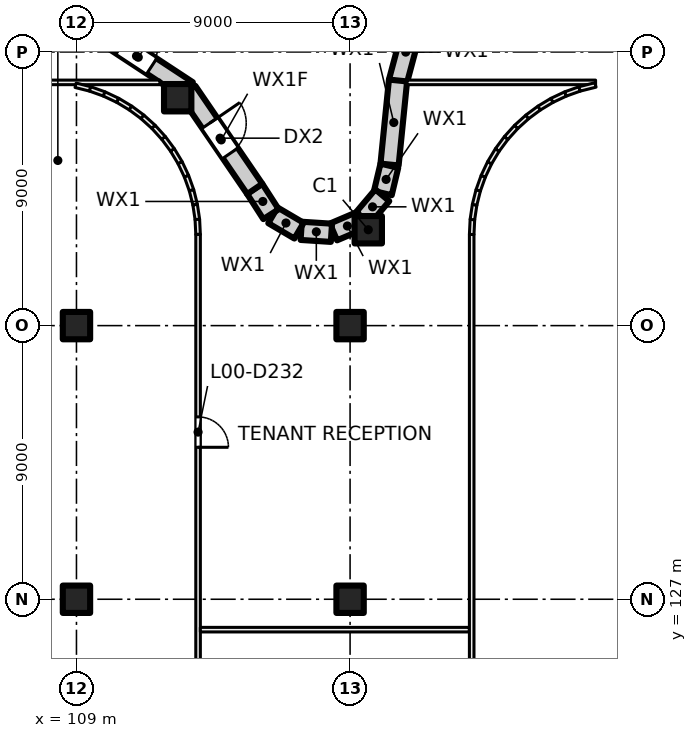
"""IFC4 building model, lengths in metres.
Left out: names, types, materials, properties, quantities, classifications, styles, units other than length and angle.
Written with IfcOpenShell. Run it as: python <this file> out.ifc"""

import sys

from ifc_helpers import new_model, si_unit, direction, frame, frame_2d, origin, origin_2d, place, context, subcontext, project, spatial, rectangle, extrude, element, fill, save


model = new_model("IFC4")
c1 = context("Model", 3, precision=1e-05, world=origin(), true_north=direction((0.0, 1.0)))
c2 = subcontext(c1, "Body", "Model", "MODEL_VIEW")
j1 = project(units=[si_unit("LENGTHUNIT", "METRE"), si_unit("PLANEANGLEUNIT", "RADIAN")], contexts=[c1])
p1 = place(None, origin())
s1 = spatial("IfcSite", under=j1, at=p1, CompositionType="ELEMENT")
p2 = place(p1, origin())
s2 = spatial("IfcBuilding", under=s1, at=p2, CompositionType="ELEMENT")
p3 = place(p2, origin())
s3 = spatial("IfcBuildingStorey", under=s2, at=p3, CompositionType="ELEMENT", Elevation=0.0)
for number, where, z_axis, x_axis in (
    (1, (109.0, 127.0, 0.0), (0.0, 0.0, 1.0), (1.0, 0.0, 0.0)),
    (2, (109.0, 136.0, 0.0), (0.0, 0.0, 1.0), (1.0, 0.0, 0.0)),
    (3, (118.0, 127.0, 0.0), (0.0, 0.0, 1.0), (1.0, 0.0, 0.0)),
    (4, (118.0, 136.0, 0.0), (0.0, 0.0, 1.0), (1.0, 0.0, 0.0)),
    (5, (112.329, 143.496, 0.0), (0.0, 0.0, 1.0), (1.0, 0.0, 0.0)),
    (6, (118.598, 139.153, 0.0), (0.0, 0.0, 1.0), (1.0, 0.0, 0.0)),
):
    element("IfcColumn", number, at=place(p3, frame(where, z_axis=z_axis, x_axis=x_axis)), inside=s3, PredefinedType="COLUMN", context=c2, shape_type="SweptSolid", body=[
        extrude(rectangle(XDim=0.9, YDim=0.9, at=origin_2d()), origin(), (0.0, 0.0, 1.0), 7.5),
    ])
p4 = place(p3, frame((119.571, 144.024, 0.0), z_axis=(0.0, 0.0, 1.0), x_axis=(0.25888565912, 0.965907974655, 0.0)))
e7 = element("IfcWall", 7, at=p4, inside=s3, PredefinedType="SOLIDWALL", context=c2, shape_type="SweptSolid", body=[
    extrude(rectangle(XDim=2.012, YDim=0.6, at=frame_2d((1.006, 0.0))), origin(), (0.0, 0.0, 1.0), 7.1),
])
p5 = place(p3, frame((119.299, 141.298, 0.0), z_axis=(0.0, 0.0, 1.0), x_axis=(0.100121632527, 0.994975205068, 0.0)))
e8 = element("IfcWall", 8, at=p5, inside=s3, PredefinedType="SOLIDWALL", context=c2, shape_type="SweptSolid", body=[
    extrude(rectangle(XDim=2.777, YDim=0.6, at=frame_2d((1.389, 0.0))), origin(), (0.0, 0.0, 1.0), 7.1),
])
p6 = place(p3, frame((119.077, 140.358, 0.0), z_axis=(0.0, 0.0, 1.0), x_axis=(0.231477954295, 0.972840149601, 0.0)))
e9 = element("IfcWall", 9, at=p6, inside=s3, PredefinedType="SOLIDWALL", context=c2, shape_type="SweptSolid", body=[
    extrude(rectangle(XDim=0.926, YDim=0.6, at=frame_2d((0.463, 0.0))), origin(), (0.0, 0.0, 1.0), 7.1),
])
for number, where, z_axis, x_axis in (
    (10, (118.417, 139.526, 0.0), (0.0, 0.0, 1.0), (0.645, 0.764, 0.0)),
    (11, (117.454, 139.081, 0.0), (0.0, 0.0, 1.0), (0.92, 0.392, 0.0)),
    (12, (116.393, 139.117, 0.0), (0.0, 0.0, 1.0), (0.998, -0.064, 0.0)),
    (13, (115.461, 139.627, 0.0), (0.0, 0.0, 1.0), (0.862, -0.507, 0.0)),
):
    element("IfcWall", number, at=place(p3, frame(where, z_axis=z_axis, x_axis=x_axis)), inside=s3, PredefinedType="SOLIDWALL", context=c2, shape_type="SweptSolid", body=[
        extrude(rectangle(XDim=0.996, YDim=0.6, at=frame_2d((0.498, 0.0))), origin(), (0.0, 0.0, 1.0), 7.1),
    ])
p7 = place(p3, frame((114.86, 140.502, 0.0), z_axis=(0.0, 0.0, 1.0), x_axis=(0.541339592117, -0.84080404733, 0.0)))
e14 = element("IfcWall", 14, at=p7, inside=s3, PredefinedType="SOLIDWALL", context=c2, shape_type="SweptSolid", body=[
    extrude(rectangle(XDim=0.996, YDim=0.6, at=frame_2d((0.498, 0.0))), origin(), (0.0, 0.0, 1.0), 7.1),
])
p8 = place(p3, frame((112.661, 143.72, 0.0), z_axis=(0.0, 0.0, 1.0), x_axis=(0.564314082571, -0.825560183277, 0.0)))
e15 = element("IfcWall", 15, at=p8, inside=s3, PredefinedType="SOLIDWALL", context=c2, shape_type="SweptSolid", body=[
    extrude(rectangle(XDim=3.905, YDim=0.6, at=frame_2d((1.953, 0.0))), origin(), (0.0, 0.0, 1.0), 7.1),
])
p9 = place(p8, frame((1.283, 0.0, 0.0)))
e16 = element("IfcOpeningElement", 16, at=p9, cuts=e15, PredefinedType="OPENING", context=c2, shape_type="SweptSolid", body=[
    extrude(rectangle(XDim=1.2, YDim=2.4, at=frame_2d((0.6, 1.2))), frame((0.0, 0.31, 0.0), z_axis=(0.0, -1.0, 0.0), x_axis=(1.0, 0.0, 0.0)), (0.0, 0.0, 1.0), 0.62),
])
p10 = place(p3, frame((109.401, 145.9, 0.0), z_axis=(0.0, 0.0, 1.0), x_axis=(0.835543958523, -0.549423601037, 0.0)))
e17 = element("IfcWall", 17, at=p10, inside=s3, PredefinedType="SOLIDWALL", context=c2, shape_type="SweptSolid", body=[
    extrude(rectangle(XDim=3.906, YDim=0.6, at=frame_2d((1.953, 0.0))), origin(), (0.0, 0.0, 1.0), 7.1),
])
p11 = place(p10, frame((1.283, 0.0, 0.0)))
e18 = element("IfcOpeningElement", 18, at=p11, cuts=e17, PredefinedType="OPENING", context=c2, shape_type="SweptSolid", body=[
    extrude(rectangle(XDim=1.2, YDim=2.4, at=frame_2d((0.6, 1.2))), frame((0.0, 0.31, 0.0), z_axis=(0.0, -1.0, 0.0), x_axis=(1.0, 0.0, 0.0)), (0.0, 0.0, 1.0), 0.62),
])
p12 = place(p3, frame((111.744, 144.0, 0.0), z_axis=(0.0, 0.0, 1.0), x_axis=(-1.0, 0.0, 0.0)))
e19 = element("IfcWall", 19, at=p12, inside=s3, PredefinedType="PARTITIONING", context=c2, shape_type="SweptSolid", body=[
    extrude(rectangle(XDim=7.907, YDim=0.15, at=frame_2d((3.954, 0.0))), origin(), (0.0, 0.0, 1.0), 7.1),
])
p13 = place(p12, frame((5.376, 0.0, 0.0)))
e20 = element("IfcOpeningElement", 20, at=p13, cuts=e19, PredefinedType="OPENING", context=c2, shape_type="SweptSolid", body=[
    extrude(rectangle(XDim=1.0, YDim=2.1, at=frame_2d((0.5, 1.05))), frame((0.0, 0.085, 0.0), z_axis=(0.0, -1.0, 0.0), x_axis=(1.0, 0.0, 0.0)), (0.0, 0.0, 1.0), 0.17),
])
p14 = place(p3, frame((108.971, 143.905, 0.0), z_axis=(0.0, 0.0, 1.0), x_axis=(0.970113715952, -0.242650732785, 0.0)))
e21 = element("IfcWall", 21, at=p14, inside=s3, PredefinedType="PARTITIONING", context=c2, shape_type="SweptSolid", body=[
    extrude(rectangle(XDim=0.499, YDim=0.15, at=frame_2d((0.25, 0.0))), origin(), (0.0, 0.0, 1.0), 7.1),
])
for number, where, z_axis, x_axis in (
    (22, (109.447, 143.786, 0.0), (0.0, 0.0, 1.0), (0.941, -0.337, 0.0)),
    (23, (109.91, 143.621, 0.0), (0.0, 0.0, 1.0), (0.904, -0.428, 0.0)),
):
    element("IfcWall", number, at=place(p3, frame(where, z_axis=z_axis, x_axis=x_axis)), inside=s3, PredefinedType="PARTITIONING", context=c2, shape_type="SweptSolid", body=[
        extrude(rectangle(XDim=0.498, YDim=0.15, at=frame_2d((0.249, 0.0))), origin(), (0.0, 0.0, 1.0), 7.1),
    ])
p15 = place(p3, frame((110.354, 143.412, 0.0), z_axis=(0.0, 0.0, 1.0), x_axis=(0.85671397893, -0.515791778052, 0.0)))
e24 = element("IfcWall", 24, at=p15, inside=s3, PredefinedType="PARTITIONING", context=c2, shape_type="SweptSolid", body=[
    extrude(rectangle(XDim=0.499, YDim=0.15, at=frame_2d((0.249, 0.0))), origin(), (0.0, 0.0, 1.0), 7.1),
])
p16 = place(p3, frame((110.775, 143.159, 0.0), z_axis=(0.0, 0.0, 1.0), x_axis=(0.80404358372, -0.594570362092, 0.0)))
e25 = element("IfcWall", 25, at=p16, inside=s3, PredefinedType="PARTITIONING", context=c2, shape_type="SweptSolid", body=[
    extrude(rectangle(XDim=0.498, YDim=0.15, at=frame_2d((0.249, 0.0))), origin(), (0.0, 0.0, 1.0), 7.1),
])
for number, where, z_axis, x_axis in (
    (26, (111.169, 142.867, 0.0), (0.0, 0.0, 1.0), (0.742, -0.67, 0.0)),
    (27, (111.533, 142.539, 0.0), (0.0, 0.0, 1.0), (0.67, -0.742, 0.0)),
):
    element("IfcWall", number, at=place(p3, frame(where, z_axis=z_axis, x_axis=x_axis)), inside=s3, PredefinedType="PARTITIONING", context=c2, shape_type="SweptSolid", body=[
        extrude(rectangle(XDim=0.499, YDim=0.15, at=frame_2d((0.249, 0.0))), origin(), (0.0, 0.0, 1.0), 7.1),
    ])
p17 = place(p3, frame((111.863, 142.175, 0.0), z_axis=(0.0, 0.0, 1.0), x_axis=(0.594570362092, -0.80404358372, 0.0)))
e28 = element("IfcWall", 28, at=p17, inside=s3, PredefinedType="PARTITIONING", context=c2, shape_type="SweptSolid", body=[
    extrude(rectangle(XDim=0.498, YDim=0.15, at=frame_2d((0.249, 0.0))), origin(), (0.0, 0.0, 1.0), 7.1),
])
p18 = place(p3, frame((112.155, 141.781, 0.0), z_axis=(0.0, 0.0, 1.0), x_axis=(0.515791778052, -0.85671397893, 0.0)))
e29 = element("IfcWall", 29, at=p18, inside=s3, PredefinedType="PARTITIONING", context=c2, shape_type="SweptSolid", body=[
    extrude(rectangle(XDim=0.499, YDim=0.15, at=frame_2d((0.249, 0.0))), origin(), (0.0, 0.0, 1.0), 7.1),
])
for number, where, z_axis, x_axis in (
    (30, (112.408, 141.36, 0.0), (0.0, 0.0, 1.0), (0.428, -0.904, 0.0)),
    (31, (112.618, 140.916, 0.0), (0.0, 0.0, 1.0), (0.337, -0.941, 0.0)),
):
    element("IfcWall", number, at=place(p3, frame(where, z_axis=z_axis, x_axis=x_axis)), inside=s3, PredefinedType="PARTITIONING", context=c2, shape_type="SweptSolid", body=[
        extrude(rectangle(XDim=0.498, YDim=0.15, at=frame_2d((0.249, 0.0))), origin(), (0.0, 0.0, 1.0), 7.1),
    ])
p19 = place(p3, frame((112.784, 140.455, 0.0), z_axis=(0.0, 0.0, 1.0), x_axis=(0.242650732785, -0.970113715952, 0.0)))
e32 = element("IfcWall", 32, at=p19, inside=s3, PredefinedType="PARTITIONING", context=c2, shape_type="SweptSolid", body=[
    extrude(rectangle(XDim=0.499, YDim=0.15, at=frame_2d((0.25, 0.0))), origin(), (0.0, 0.0, 1.0), 7.1),
])
p20 = place(p3, frame((112.903, 139.979, 0.0), z_axis=(0.0, 0.0, 1.0), x_axis=(0.148412307247, -0.988925572052, 0.0)))
e33 = element("IfcWall", 33, at=p20, inside=s3, PredefinedType="PARTITIONING", context=c2, shape_type="SweptSolid", body=[
    extrude(rectangle(XDim=0.499, YDim=0.15, at=frame_2d((0.249, 0.0))), origin(), (0.0, 0.0, 1.0), 7.1),
])
p21 = place(p3, frame((112.976, 139.494, 0.0), z_axis=(0.0, 0.0, 1.0), x_axis=(0.048196018647, -0.998837896651, 0.0)))
e34 = element("IfcWall", 34, at=p21, inside=s3, PredefinedType="PARTITIONING", context=c2, shape_type="SweptSolid", body=[
    extrude(rectangle(XDim=0.496, YDim=0.15, at=frame_2d((0.248, 0.0))), origin(), (0.0, 0.0, 1.0), 7.1),
])
p22 = place(p3, frame((113.0, 139.002, 0.0), z_axis=(0.0, 0.0, 1.0), x_axis=(0.0, -1.0, 0.0)))
e35 = element("IfcWall", 35, at=p22, inside=s3, PredefinedType="PARTITIONING", context=c2, shape_type="SweptSolid", body=[
    extrude(rectangle(XDim=22.004, YDim=0.15, at=frame_2d((11.002, 0.0))), origin(), (0.0, 0.0, 1.0), 7.1),
])
p23 = place(p22, frame((17.0, 0.0, 0.0)))
e36 = element("IfcOpeningElement", 36, at=p23, cuts=e35, PredefinedType="OPENING", context=c2, shape_type="SweptSolid", body=[
    extrude(rectangle(XDim=1.0, YDim=2.1, at=frame_2d((0.5, 1.05))), frame((0.0, 0.085, 0.0), z_axis=(0.0, -1.0, 0.0), x_axis=(1.0, 0.0, 0.0)), (0.0, 0.0, 1.0), 0.17),
])
p24 = place(p22, frame((6.004, 0.0, 0.0)))
e37 = element("IfcOpeningElement", 37, at=p24, cuts=e35, PredefinedType="OPENING", context=c2, shape_type="SweptSolid", body=[
    extrude(rectangle(XDim=1.0, YDim=2.1, at=frame_2d((0.5, 1.05))), frame((0.0, 0.085, 0.0), z_axis=(0.0, -1.0, 0.0), x_axis=(1.0, 0.0, 0.0)), (0.0, 0.0, 1.0), 0.17),
])
p25 = place(p3, frame((113.075, 126.0, 0.0), z_axis=(0.0, 0.0, 1.0), x_axis=(1.0, 0.0, 0.0)))
e38 = element("IfcWall", 38, at=p25, inside=s3, PredefinedType="PARTITIONING", context=c2, shape_type="SweptSolid", body=[
    extrude(rectangle(XDim=8.85, YDim=0.15, at=frame_2d((4.425, 0.0))), origin(), (0.0, 0.0, 1.0), 7.1),
])
p26 = place(p3, frame((119.875, 144.0, 0.0), z_axis=(0.0, 0.0, 1.0), x_axis=(1.0, 0.0, 0.0)))
e39 = element("IfcWall", 39, at=p26, inside=s3, PredefinedType="PARTITIONING", context=c2, shape_type="SweptSolid", body=[
    extrude(rectangle(XDim=6.2, YDim=0.15, at=frame_2d((3.1, 0.0))), origin(), (0.0, 0.0, 1.0), 7.1),
])
p27 = place(p3, frame((122.0, 116.998, 0.0), z_axis=(0.0, 0.0, 1.0), x_axis=(0.0, 1.0, 0.0)))
e40 = element("IfcWall", 40, at=p27, inside=s3, PredefinedType="PARTITIONING", context=c2, shape_type="SweptSolid", body=[
    extrude(rectangle(XDim=22.004, YDim=0.15, at=frame_2d((11.002, 0.0))), origin(), (0.0, 0.0, 1.0), 7.1),
])
p28 = place(p3, frame((122.0, 138.998, 0.0), z_axis=(0.0, 0.0, 1.0), x_axis=(0.048196018647, 0.998837896651, 0.0)))
e41 = element("IfcWall", 41, at=p28, inside=s3, PredefinedType="PARTITIONING", context=c2, shape_type="SweptSolid", body=[
    extrude(rectangle(XDim=0.496, YDim=0.15, at=frame_2d((0.248, 0.0))), origin(), (0.0, 0.0, 1.0), 7.1),
])
p29 = place(p3, frame((122.023, 139.486, 0.0), z_axis=(0.0, 0.0, 1.0), x_axis=(0.148412307247, 0.988925572052, 0.0)))
e42 = element("IfcWall", 42, at=p29, inside=s3, PredefinedType="PARTITIONING", context=c2, shape_type="SweptSolid", body=[
    extrude(rectangle(XDim=0.499, YDim=0.15, at=frame_2d((0.249, 0.0))), origin(), (0.0, 0.0, 1.0), 7.1),
])
p30 = place(p3, frame((122.095, 139.971, 0.0), z_axis=(0.0, 0.0, 1.0), x_axis=(0.242650732785, 0.970113715952, 0.0)))
e43 = element("IfcWall", 43, at=p30, inside=s3, PredefinedType="PARTITIONING", context=c2, shape_type="SweptSolid", body=[
    extrude(rectangle(XDim=0.499, YDim=0.15, at=frame_2d((0.25, 0.0))), origin(), (0.0, 0.0, 1.0), 7.1),
])
for number, where, z_axis, x_axis in (
    (44, (122.214, 140.447, 0.0), (0.0, 0.0, 1.0), (0.337, 0.941, 0.0)),
    (45, (122.379, 140.91, 0.0), (0.0, 0.0, 1.0), (0.428, 0.904, 0.0)),
):
    element("IfcWall", number, at=place(p3, frame(where, z_axis=z_axis, x_axis=x_axis)), inside=s3, PredefinedType="PARTITIONING", context=c2, shape_type="SweptSolid", body=[
        extrude(rectangle(XDim=0.498, YDim=0.15, at=frame_2d((0.249, 0.0))), origin(), (0.0, 0.0, 1.0), 7.1),
    ])
p31 = place(p3, frame((122.588, 141.354, 0.0), z_axis=(0.0, 0.0, 1.0), x_axis=(0.515791778052, 0.85671397893, 0.0)))
e46 = element("IfcWall", 46, at=p31, inside=s3, PredefinedType="PARTITIONING", context=c2, shape_type="SweptSolid", body=[
    extrude(rectangle(XDim=0.499, YDim=0.15, at=frame_2d((0.249, 0.0))), origin(), (0.0, 0.0, 1.0), 7.1),
])
p32 = place(p3, frame((122.841, 141.775, 0.0), z_axis=(0.0, 0.0, 1.0), x_axis=(0.594570362092, 0.80404358372, 0.0)))
e47 = element("IfcWall", 47, at=p32, inside=s3, PredefinedType="PARTITIONING", context=c2, shape_type="SweptSolid", body=[
    extrude(rectangle(XDim=0.498, YDim=0.15, at=frame_2d((0.249, 0.0))), origin(), (0.0, 0.0, 1.0), 7.1),
])
for number, where, z_axis, x_axis in (
    (48, (123.133, 142.169, 0.0), (0.0, 0.0, 1.0), (0.67, 0.742, 0.0)),
    (49, (123.461, 142.533, 0.0), (0.0, 0.0, 1.0), (0.742, 0.67, 0.0)),
):
    element("IfcWall", number, at=place(p3, frame(where, z_axis=z_axis, x_axis=x_axis)), inside=s3, PredefinedType="PARTITIONING", context=c2, shape_type="SweptSolid", body=[
        extrude(rectangle(XDim=0.499, YDim=0.15, at=frame_2d((0.249, 0.0))), origin(), (0.0, 0.0, 1.0), 7.1),
    ])
p33 = place(p3, frame((123.825, 142.863, 0.0), z_axis=(0.0, 0.0, 1.0), x_axis=(0.80404358372, 0.594570362092, 0.0)))
e50 = element("IfcWall", 50, at=p33, inside=s3, PredefinedType="PARTITIONING", context=c2, shape_type="SweptSolid", body=[
    extrude(rectangle(XDim=0.498, YDim=0.15, at=frame_2d((0.249, 0.0))), origin(), (0.0, 0.0, 1.0), 7.1),
])
p34 = place(p3, frame((124.219, 143.155, 0.0), z_axis=(0.0, 0.0, 1.0), x_axis=(0.85671397893, 0.515791778052, 0.0)))
e51 = element("IfcWall", 51, at=p34, inside=s3, PredefinedType="PARTITIONING", context=c2, shape_type="SweptSolid", body=[
    extrude(rectangle(XDim=0.499, YDim=0.15, at=frame_2d((0.249, 0.0))), origin(), (0.0, 0.0, 1.0), 7.1),
])
for number, where, z_axis, x_axis in (
    (52, (124.64, 143.408, 0.0), (0.0, 0.0, 1.0), (0.904, 0.428, 0.0)),
    (53, (125.084, 143.618, 0.0), (0.0, 0.0, 1.0), (0.941, 0.337, 0.0)),
):
    element("IfcWall", number, at=place(p3, frame(where, z_axis=z_axis, x_axis=x_axis)), inside=s3, PredefinedType="PARTITIONING", context=c2, shape_type="SweptSolid", body=[
        extrude(rectangle(XDim=0.498, YDim=0.15, at=frame_2d((0.249, 0.0))), origin(), (0.0, 0.0, 1.0), 7.1),
    ])
p35 = place(p3, frame((125.545, 143.784, 0.0), z_axis=(0.0, 0.0, 1.0), x_axis=(0.970116111764, 0.242641154168, 0.0)))
e54 = element("IfcWall", 54, at=p35, inside=s3, PredefinedType="PARTITIONING", context=c2, shape_type="SweptSolid", body=[
    extrude(rectangle(XDim=0.544, YDim=0.15, at=frame_2d((0.272, 0.0))), origin(), (0.0, 0.0, 1.0), 7.1),
])
p36 = place(p9, origin())
e55 = element("IfcDoor", 55, at=p36, inside=s3, OperationType="SINGLE_SWING_LEFT", PredefinedType="DOOR", context=c2, shape_type="SweptSolid", body=[
    extrude(rectangle(XDim=1.2, YDim=2.4, at=frame_2d((0.6, 1.2))), frame((0.0, 0.025, 0.0), z_axis=(0.0, -1.0, 0.0), x_axis=(1.0, 0.0, 0.0)), (0.0, 0.0, 1.0), 0.05),
])
fill(e16, e55)
p37 = place(p11, origin())
e56 = element("IfcDoor", 56, at=p37, inside=s3, OperationType="SINGLE_SWING_RIGHT", PredefinedType="DOOR", context=c2, shape_type="SweptSolid", body=[
    extrude(rectangle(XDim=1.2, YDim=2.4, at=frame_2d((0.6, 1.2))), frame((0.0, 0.025, 0.0), z_axis=(0.0, -1.0, 0.0), x_axis=(1.0, 0.0, 0.0)), (0.0, 0.0, 1.0), 0.05),
])
fill(e18, e56)
p38 = place(p24, origin())
e57 = element("IfcDoor", 57, at=p38, inside=s3, OperationType="SINGLE_SWING_RIGHT", PredefinedType="DOOR", context=c2, shape_type="SweptSolid", body=[
    extrude(rectangle(XDim=1.0, YDim=2.1, at=frame_2d((0.5, 1.05))), frame((0.0, 0.025, 0.0), z_axis=(0.0, -1.0, 0.0), x_axis=(1.0, 0.0, 0.0)), (0.0, 0.0, 1.0), 0.05),
])
fill(e37, e57)
save(model, sys.argv[1])
